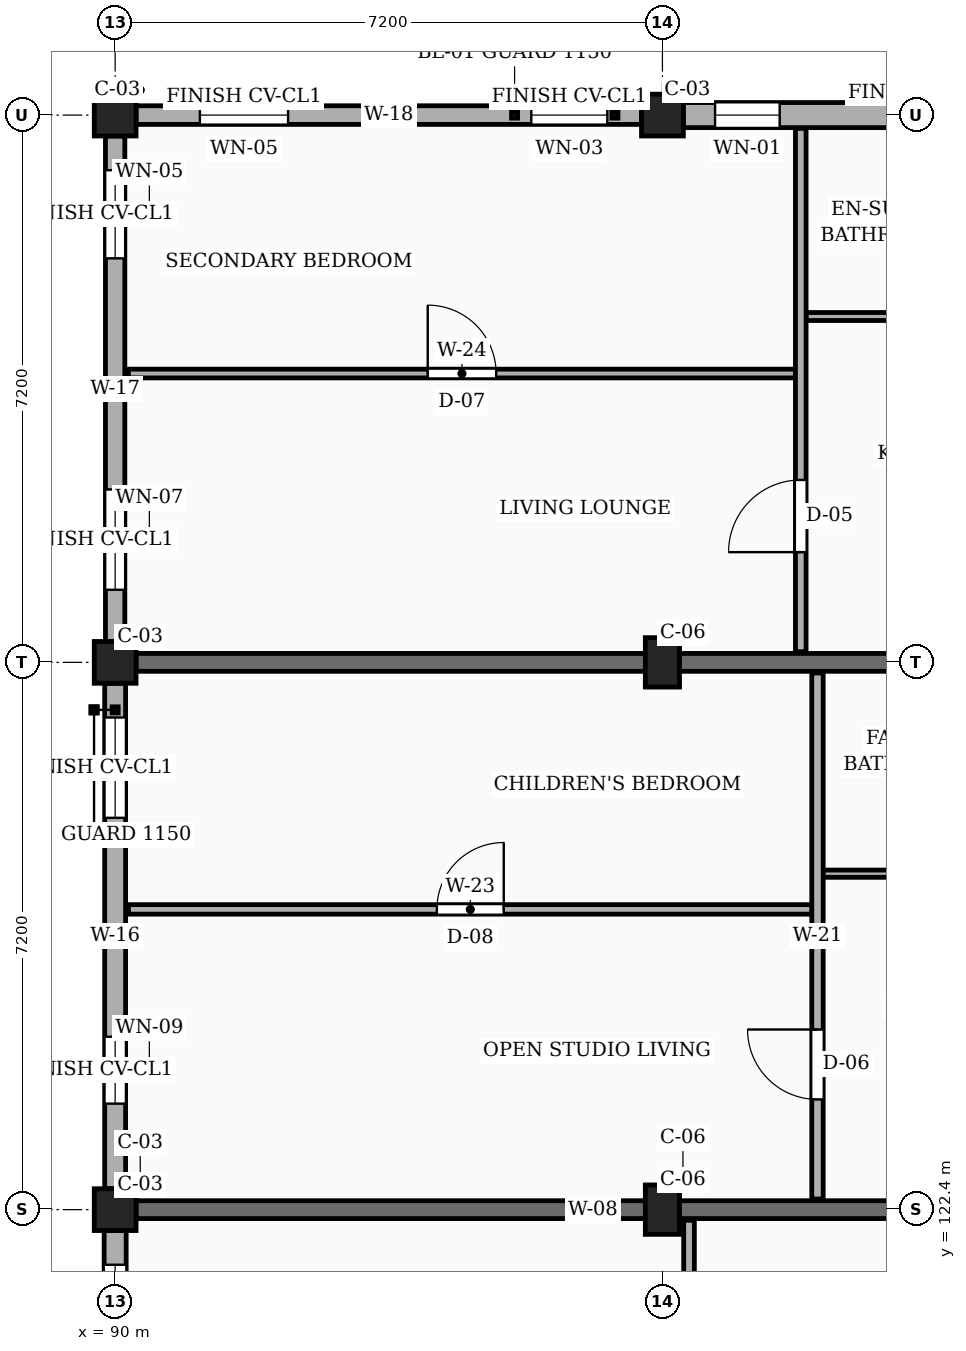
"""IFC4 building model, lengths in metres.
Left out: names, types, materials, properties, quantities, classifications, styles, units other than length and angle.
Written with IfcOpenShell. Run it as: python <this file> out.ifc"""

import sys

from ifc_helpers import new_model, si_unit, direction, frame, frame_2d, origin, origin_2d, place, context, subcontext, project, spatial, rectangle, extrude, element, fill, save


model = new_model("IFC4")
c1 = context("Model", 3, precision=1e-05, world=origin(), true_north=direction((0.0, 1.0)))
c2 = subcontext(c1, "Body", "Model", "MODEL_VIEW")
j1 = project(units=[si_unit("LENGTHUNIT", "METRE"), si_unit("PLANEANGLEUNIT", "RADIAN")], contexts=[c1])
p1 = place(None, origin())
s1 = spatial("IfcSite", under=j1, at=p1, CompositionType="ELEMENT")
p2 = place(p1, origin())
s2 = spatial("IfcBuilding", under=s1, at=p2, CompositionType="ELEMENT")
p3 = place(p2, frame((0.0, 0.0, 20.25)))
s3 = spatial("IfcBuildingStorey", under=s2, at=p3, CompositionType="ELEMENT", Elevation=20.25)
for number, where, z_axis, x_axis in (
    (1, (90.0, 122.4, 0.0), (0.0, 0.0, 1.0), (1.0, 0.0, 0.0)),
    (2, (90.0, 129.6, 0.0), (0.0, 0.0, 1.0), (1.0, 0.0, 0.0)),
    (3, (90.0, 136.8, 0.0), (0.0, 0.0, 1.0), (1.0, 0.0, 0.0)),
):
    element("IfcColumn", number, at=place(p3, frame(where, z_axis=z_axis, x_axis=x_axis)), inside=s3, PredefinedType="COLUMN", context=c2, shape_type="SweptSolid", body=[
        extrude(rectangle(XDim=0.55, YDim=0.55, at=origin_2d()), origin(), (0.0, 0.0, 1.0), 3.15),
    ])
for number, where, z_axis, x_axis in (
    (4, (97.2, 122.4, 0.0), (0.0, 0.0, 1.0), (1.0, 0.0, 0.0)),
    (5, (97.2, 129.6, 0.0), (0.0, 0.0, 1.0), (1.0, 0.0, 0.0)),
):
    element("IfcColumn", number, at=place(p3, frame(where, z_axis=z_axis, x_axis=x_axis)), inside=s3, PredefinedType="COLUMN", context=c2, shape_type="SweptSolid", body=[
        extrude(rectangle(XDim=0.45, YDim=0.65, at=origin_2d()), origin(), (0.0, 0.0, 1.0), 3.15),
    ])
p4 = place(p3, frame((97.2, 136.8, 0.0), z_axis=(0.0, 0.0, 1.0), x_axis=(1.0, 0.0, 0.0)))
e6 = element("IfcColumn", 6, at=p4, inside=s3, PredefinedType="COLUMN", context=c2, shape_type="SweptSolid", body=[
    extrude(rectangle(XDim=0.55, YDim=0.55, at=origin_2d()), origin(), (0.0, 0.0, 1.0), 3.15),
])
for number, where, z_axis, x_axis in (
    (7, (90.275, 122.4, 0.0), (0.0, 0.0, 1.0), (1.0, 0.0, 0.0)),
    (8, (90.275, 129.6, 0.0), (0.0, 0.0, 1.0), (1.0, 0.0, 0.0)),
):
    element("IfcWall", number, at=place(p3, frame(where, z_axis=z_axis, x_axis=x_axis)), inside=s3, PredefinedType="SOLIDWALL", context=c2, shape_type="SweptSolid", body=[
        extrude(rectangle(XDim=12.025, YDim=0.235, at=frame_2d((6.013, 0.0))), origin(), (0.0, 0.0, 1.0), 2.19),
    ])
p5 = place(p3, frame((104.125, 136.8, 0.0), z_axis=(0.0, 0.0, 1.0), x_axis=(-1.0, 0.0, 0.0)))
e9 = element("IfcWall", 9, at=p5, inside=s3, PredefinedType="SOLIDWALL", context=c2, shape_type="SweptSolid", body=[
    extrude(rectangle(XDim=6.65, YDim=0.33, at=frame_2d((3.325, 0.0))), origin(), (0.0, 0.0, 1.0), 2.46),
])
p6 = place(p5, frame((0.462, 0.0, 0.78)))
e10 = element("IfcOpeningElement", 10, at=p6, cuts=e9, PredefinedType="OPENING", context=c2, shape_type="SweptSolid", body=[
    extrude(rectangle(XDim=1.04, YDim=1.26, at=frame_2d((0.52, 0.63))), frame((0.0, 0.175, 0.0), z_axis=(0.0, -1.0, 0.0), x_axis=(1.0, 0.0, 0.0)), (0.0, 0.0, 1.0), 0.35),
])
p7 = place(p5, frame((3.005, 0.0, 0.78)))
e11 = element("IfcOpeningElement", 11, at=p7, cuts=e9, PredefinedType="OPENING", context=c2, shape_type="SweptSolid", body=[
    extrude(rectangle(XDim=0.92, YDim=1.15, at=frame_2d((0.46, 0.575))), frame((0.0, 0.175, 0.0), z_axis=(0.0, -1.0, 0.0), x_axis=(1.0, 0.0, 0.0)), (0.0, 0.0, 1.0), 0.35),
])
p8 = place(p5, frame((5.383, 0.0, 0.78)))
e12 = element("IfcOpeningElement", 12, at=p8, cuts=e9, PredefinedType="OPENING", context=c2, shape_type="SweptSolid", body=[
    extrude(rectangle(XDim=0.85, YDim=1.15, at=frame_2d((0.425, 0.575))), frame((0.0, 0.175, 0.0), z_axis=(0.0, -1.0, 0.0), x_axis=(1.0, 0.0, 0.0)), (0.0, 0.0, 1.0), 0.35),
])
p9 = place(p3, frame((96.925, 136.8, 0.0), z_axis=(0.0, 0.0, 1.0), x_axis=(-1.0, 0.0, 0.0)))
e13 = element("IfcWall", 13, at=p9, inside=s3, PredefinedType="SOLIDWALL", context=c2, shape_type="SweptSolid", body=[
    extrude(rectangle(XDim=6.65, YDim=0.245, at=frame_2d((3.325, 0.0))), origin(), (0.0, 0.0, 1.0), 2.46),
])
p10 = place(p9, frame((0.45, 0.0, 0.78)))
e14 = element("IfcOpeningElement", 14, at=p10, cuts=e13, PredefinedType="OPENING", context=c2, shape_type="SweptSolid", body=[
    extrude(rectangle(XDim=1.0, YDim=1.15, at=frame_2d((0.5, 0.575))), frame((0.0, 0.133, 0.0), z_axis=(0.0, -1.0, 0.0), x_axis=(1.0, 0.0, 0.0)), (0.0, 0.0, 1.0), 0.265),
])
p11 = place(p9, frame((4.65, 0.0, 0.78)))
e15 = element("IfcOpeningElement", 15, at=p11, cuts=e13, PredefinedType="OPENING", context=c2, shape_type="SweptSolid", body=[
    extrude(rectangle(XDim=1.16, YDim=1.15, at=frame_2d((0.58, 0.575))), frame((0.0, 0.133, 0.0), z_axis=(0.0, -1.0, 0.0), x_axis=(1.0, 0.0, 0.0)), (0.0, 0.0, 1.0), 0.265),
])
p12 = place(p3, frame((90.0, 136.525, 0.0), z_axis=(0.0, 0.0, 1.0), x_axis=(0.0, -1.0, 0.0)))
e16 = element("IfcWall", 16, at=p12, inside=s3, PredefinedType="SOLIDWALL", context=c2, shape_type="SweptSolid", body=[
    extrude(rectangle(XDim=6.65, YDim=0.255, at=frame_2d((3.325, 0.0))), origin(), (0.0, 0.0, 1.0), 2.46),
])
p13 = place(p12, frame((0.45, 0.0, 0.78)))
e17 = element("IfcOpeningElement", 17, at=p13, cuts=e16, PredefinedType="OPENING", context=c2, shape_type="SweptSolid", body=[
    extrude(rectangle(XDim=1.16, YDim=1.15, at=frame_2d((0.58, 0.575))), frame((0.0, 0.137, 0.0), z_axis=(0.0, -1.0, 0.0), x_axis=(1.0, 0.0, 0.0)), (0.0, 0.0, 1.0), 0.275),
])
p14 = place(p12, frame((4.65, 0.0, 0.78)))
e18 = element("IfcOpeningElement", 18, at=p14, cuts=e16, PredefinedType="OPENING", context=c2, shape_type="SweptSolid", body=[
    extrude(rectangle(XDim=1.32, YDim=1.15, at=frame_2d((0.66, 0.575))), frame((0.0, 0.137, 0.0), z_axis=(0.0, -1.0, 0.0), x_axis=(1.0, 0.0, 0.0)), (0.0, 0.0, 1.0), 0.275),
])
p15 = place(p3, frame((90.0, 129.325, 0.0), z_axis=(0.0, 0.0, 1.0), x_axis=(0.0, -1.0, 0.0)))
e19 = element("IfcWall", 19, at=p15, inside=s3, PredefinedType="SOLIDWALL", context=c2, shape_type="SweptSolid", body=[
    extrude(rectangle(XDim=6.65, YDim=0.275, at=frame_2d((3.325, 0.0))), origin(), (0.0, 0.0, 1.0), 2.46),
])
p16 = place(p15, frame((0.45, 0.0, 0.78)))
e20 = element("IfcOpeningElement", 20, at=p16, cuts=e19, PredefinedType="OPENING", context=c2, shape_type="SweptSolid", body=[
    extrude(rectangle(XDim=1.32, YDim=1.15, at=frame_2d((0.66, 0.575))), frame((0.0, 0.147, 0.0), z_axis=(0.0, -1.0, 0.0), x_axis=(1.0, 0.0, 0.0)), (0.0, 0.0, 1.0), 0.295),
])
p17 = place(p15, frame((4.65, 0.0, 0.78)))
e21 = element("IfcOpeningElement", 21, at=p17, cuts=e19, PredefinedType="OPENING", context=c2, shape_type="SweptSolid", body=[
    extrude(rectangle(XDim=0.88, YDim=1.26, at=frame_2d((0.44, 0.63))), frame((0.0, 0.147, 0.0), z_axis=(0.0, -1.0, 0.0), x_axis=(1.0, 0.0, 0.0)), (0.0, 0.0, 1.0), 0.295),
])
p18 = place(p3, frame((90.0, 122.125, 0.0), z_axis=(0.0, 0.0, 1.0), x_axis=(0.0, -1.0, 0.0)))
e22 = element("IfcWall", 22, at=p18, inside=s3, PredefinedType="SOLIDWALL", context=c2, shape_type="SweptSolid", body=[
    extrude(rectangle(XDim=6.65, YDim=0.29, at=frame_2d((3.325, 0.0))), origin(), (0.0, 0.0, 1.0), 2.46),
])
p19 = place(p18, frame((0.45, 0.0, 0.78)))
e23 = element("IfcOpeningElement", 23, at=p19, cuts=e22, PredefinedType="OPENING", context=c2, shape_type="SweptSolid", body=[
    extrude(rectangle(XDim=0.88, YDim=1.26, at=frame_2d((0.44, 0.63))), frame((0.0, 0.155, 0.0), z_axis=(0.0, -1.0, 0.0), x_axis=(1.0, 0.0, 0.0)), (0.0, 0.0, 1.0), 0.31),
])
p20 = place(p18, frame((4.65, 0.0, 0.78)))
e24 = element("IfcOpeningElement", 24, at=p20, cuts=e22, PredefinedType="OPENING", context=c2, shape_type="SweptSolid", body=[
    extrude(rectangle(XDim=1.04, YDim=1.26, at=frame_2d((0.52, 0.63))), frame((0.0, 0.155, 0.0), z_axis=(0.0, -1.0, 0.0), x_axis=(1.0, 0.0, 0.0)), (0.0, 0.0, 1.0), 0.31),
])
p21 = place(p3, frame((97.55, 115.34, 0.0), z_axis=(0.0, 0.0, 1.0), x_axis=(0.0, 1.0, 0.0)))
e25 = element("IfcWall", 25, at=p21, inside=s3, PredefinedType="PARTITIONING", context=c2, shape_type="SweptSolid", body=[
    extrude(rectangle(XDim=6.92, YDim=0.14, at=frame_2d((3.46, 0.0))), origin(), (0.0, 0.0, 1.0), 2.325),
])
p22 = place(p21, frame((4.66, 0.0, 0.0)))
e26 = element("IfcOpeningElement", 26, at=p22, cuts=e25, PredefinedType="OPENING", context=c2, shape_type="SweptSolid", body=[
    extrude(rectangle(XDim=0.95, YDim=2.1, at=frame_2d((0.475, 1.05))), frame((0.0, 0.08, 0.0), z_axis=(0.0, -1.0, 0.0), x_axis=(1.0, 0.0, 0.0)), (0.0, 0.0, 1.0), 0.16),
])
p23 = place(p3, frame((90.175, 126.35, 0.0), z_axis=(0.0, 0.0, 1.0), x_axis=(1.0, 0.0, 0.0)))
e27 = element("IfcWall", 27, at=p23, inside=s3, PredefinedType="PARTITIONING", context=c2, shape_type="SweptSolid", body=[
    extrude(rectangle(XDim=8.995, YDim=0.125, at=frame_2d((4.498, 0.0))), origin(), (0.0, 0.0, 1.0), 2.325),
])
p24 = place(p23, frame((4.058, 0.0, 0.0)))
e28 = element("IfcOpeningElement", 28, at=p24, cuts=e27, PredefinedType="OPENING", context=c2, shape_type="SweptSolid", body=[
    extrude(rectangle(XDim=0.88, YDim=2.08, at=frame_2d((0.44, 1.04))), frame((0.0, 0.073, 0.0), z_axis=(0.0, -1.0, 0.0), x_axis=(1.0, 0.0, 0.0)), (0.0, 0.0, 1.0), 0.145),
])
p25 = place(p3, frame((99.31, 126.82, 0.0), z_axis=(0.0, 0.0, 1.0), x_axis=(1.0, 0.0, 0.0)))
e29 = element("IfcWall", 29, at=p25, inside=s3, PredefinedType="PARTITIONING", context=c2, shape_type="SweptSolid", body=[
    extrude(rectangle(XDim=2.9, YDim=0.095, at=frame_2d((1.45, 0.0))), origin(), (0.0, 0.0, 1.0), 2.325),
])
p26 = place(p25, frame((1.015, 0.0, 0.0)))
e30 = element("IfcOpeningElement", 30, at=p26, cuts=e29, PredefinedType="OPENING", context=c2, shape_type="SweptSolid", body=[
    extrude(rectangle(XDim=0.87, YDim=2.05, at=frame_2d((0.435, 1.025))), frame((0.0, 0.058, 0.0), z_axis=(0.0, -1.0, 0.0), x_axis=(1.0, 0.0, 0.0)), (0.0, 0.0, 1.0), 0.115),
])
p27 = place(p3, frame((99.24, 122.54, 0.0), z_axis=(0.0, 0.0, 1.0), x_axis=(0.0, 1.0, 0.0)))
e31 = element("IfcWall", 31, at=p27, inside=s3, PredefinedType="PARTITIONING", context=c2, shape_type="SweptSolid", body=[
    extrude(rectangle(XDim=6.92, YDim=0.15, at=frame_2d((3.46, 0.0))), origin(), (0.0, 0.0, 1.0), 2.325),
])
p28 = place(p27, frame((1.31, 0.0, 0.0)))
e32 = element("IfcOpeningElement", 32, at=p28, cuts=e31, PredefinedType="OPENING", context=c2, shape_type="SweptSolid", body=[
    extrude(rectangle(XDim=0.92, YDim=2.1, at=frame_2d((0.46, 1.05))), frame((0.0, 0.085, 0.0), z_axis=(0.0, -1.0, 0.0), x_axis=(1.0, 0.0, 0.0)), (0.0, 0.0, 1.0), 0.17),
])
p29 = place(p3, frame((90.175, 133.4, 0.0), z_axis=(0.0, 0.0, 1.0), x_axis=(1.0, 0.0, 0.0)))
e33 = element("IfcWall", 33, at=p29, inside=s3, PredefinedType="PARTITIONING", context=c2, shape_type="SweptSolid", body=[
    extrude(rectangle(XDim=8.775, YDim=0.115, at=frame_2d((4.387, 0.0))), origin(), (0.0, 0.0, 1.0), 2.325),
])
p30 = place(p29, frame((3.938, 0.0, 0.0)))
e34 = element("IfcOpeningElement", 34, at=p30, cuts=e33, PredefinedType="OPENING", context=c2, shape_type="SweptSolid", body=[
    extrude(rectangle(XDim=0.9, YDim=2.1, at=frame_2d((0.45, 1.05))), frame((0.0, 0.067, 0.0), z_axis=(0.0, -1.0, 0.0), x_axis=(1.0, 0.0, 0.0)), (0.0, 0.0, 1.0), 0.135),
])
p31 = place(p3, frame((99.09, 134.15, 0.0), z_axis=(0.0, 0.0, 1.0), x_axis=(1.0, 0.0, 0.0)))
e35 = element("IfcWall", 35, at=p31, inside=s3, PredefinedType="PARTITIONING", context=c2, shape_type="SweptSolid", body=[
    extrude(rectangle(XDim=3.12, YDim=0.105, at=frame_2d((1.56, 0.0))), origin(), (0.0, 0.0, 1.0), 2.325),
])
p32 = place(p31, frame((1.11, 0.0, 0.0)))
e36 = element("IfcOpeningElement", 36, at=p32, cuts=e35, PredefinedType="OPENING", context=c2, shape_type="SweptSolid", body=[
    extrude(rectangle(XDim=0.9, YDim=2.05, at=frame_2d((0.45, 1.025))), frame((0.0, 0.062, 0.0), z_axis=(0.0, -1.0, 0.0), x_axis=(1.0, 0.0, 0.0)), (0.0, 0.0, 1.0), 0.125),
])
p33 = place(p3, frame((99.02, 129.74, 0.0), z_axis=(0.0, 0.0, 1.0), x_axis=(0.0, 1.0, 0.0)))
e37 = element("IfcWall", 37, at=p33, inside=s3, PredefinedType="PARTITIONING", context=c2, shape_type="SweptSolid", body=[
    extrude(rectangle(XDim=6.885, YDim=0.14, at=frame_2d((3.442, 0.0))), origin(), (0.0, 0.0, 1.0), 2.325),
])
p34 = place(p33, frame((1.31, 0.0, 0.0)))
e38 = element("IfcOpeningElement", 38, at=p34, cuts=e37, PredefinedType="OPENING", context=c2, shape_type="SweptSolid", body=[
    extrude(rectangle(XDim=0.95, YDim=2.1, at=frame_2d((0.475, 1.05))), frame((0.0, 0.08, 0.0), z_axis=(0.0, -1.0, 0.0), x_axis=(1.0, 0.0, 0.0)), (0.0, 0.0, 1.0), 0.16),
])
p35 = place(p8, origin())
e39 = element("IfcWindow", 39, at=p35, inside=s3, PartitioningType="SINGLE_PANEL", PredefinedType="WINDOW", context=c2, shape_type="SweptSolid", body=[
    extrude(rectangle(XDim=0.85, YDim=1.15, at=frame_2d((0.425, 0.575))), frame((0.0, 0.03, 0.0), z_axis=(0.0, -1.0, 0.0), x_axis=(1.0, 0.0, 0.0)), (0.0, 0.0, 1.0), 0.06),
])
fill(e12, e39)
p36 = place(p10, origin())
e40 = element("IfcWindow", 40, at=p36, inside=s3, PartitioningType="SINGLE_PANEL", PredefinedType="WINDOW", context=c2, shape_type="SweptSolid", body=[
    extrude(rectangle(XDim=1.0, YDim=1.15, at=frame_2d((0.5, 0.575))), frame((0.0, 0.03, 0.0), z_axis=(0.0, -1.0, 0.0), x_axis=(1.0, 0.0, 0.0)), (0.0, 0.0, 1.0), 0.06),
])
fill(e14, e40)
p37 = place(p11, origin())
e41 = element("IfcWindow", 41, at=p37, inside=s3, PartitioningType="SINGLE_PANEL", PredefinedType="WINDOW", context=c2, shape_type="SweptSolid", body=[
    extrude(rectangle(XDim=1.16, YDim=1.15, at=frame_2d((0.58, 0.575))), frame((0.0, 0.03, 0.0), z_axis=(0.0, -1.0, 0.0), x_axis=(1.0, 0.0, 0.0)), (0.0, 0.0, 1.0), 0.06),
])
fill(e15, e41)
p38 = place(p13, origin())
e42 = element("IfcWindow", 42, at=p38, inside=s3, PartitioningType="SINGLE_PANEL", PredefinedType="WINDOW", context=c2, shape_type="SweptSolid", body=[
    extrude(rectangle(XDim=1.16, YDim=1.15, at=frame_2d((0.58, 0.575))), frame((0.0, 0.03, 0.0), z_axis=(0.0, -1.0, 0.0), x_axis=(1.0, 0.0, 0.0)), (0.0, 0.0, 1.0), 0.06),
])
fill(e17, e42)
p39 = place(p14, origin())
e43 = element("IfcWindow", 43, at=p39, inside=s3, PartitioningType="SINGLE_PANEL", PredefinedType="WINDOW", context=c2, shape_type="SweptSolid", body=[
    extrude(rectangle(XDim=1.32, YDim=1.15, at=frame_2d((0.66, 0.575))), frame((0.0, 0.03, 0.0), z_axis=(0.0, -1.0, 0.0), x_axis=(1.0, 0.0, 0.0)), (0.0, 0.0, 1.0), 0.06),
])
fill(e18, e43)
p40 = place(p16, origin())
e44 = element("IfcWindow", 44, at=p40, inside=s3, PartitioningType="SINGLE_PANEL", PredefinedType="WINDOW", context=c2, shape_type="SweptSolid", body=[
    extrude(rectangle(XDim=1.32, YDim=1.15, at=frame_2d((0.66, 0.575))), frame((0.0, 0.03, 0.0), z_axis=(0.0, -1.0, 0.0), x_axis=(1.0, 0.0, 0.0)), (0.0, 0.0, 1.0), 0.06),
])
fill(e20, e44)
p41 = place(p17, origin())
e45 = element("IfcWindow", 45, at=p41, inside=s3, PartitioningType="SINGLE_PANEL", PredefinedType="WINDOW", context=c2, shape_type="SweptSolid", body=[
    extrude(rectangle(XDim=0.88, YDim=1.26, at=frame_2d((0.44, 0.63))), frame((0.0, 0.03, 0.0), z_axis=(0.0, -1.0, 0.0), x_axis=(1.0, 0.0, 0.0)), (0.0, 0.0, 1.0), 0.06),
])
fill(e21, e45)
p42 = place(p19, origin())
e46 = element("IfcWindow", 46, at=p42, inside=s3, PartitioningType="SINGLE_PANEL", PredefinedType="WINDOW", context=c2, shape_type="SweptSolid", body=[
    extrude(rectangle(XDim=0.88, YDim=1.26, at=frame_2d((0.44, 0.63))), frame((0.0, 0.03, 0.0), z_axis=(0.0, -1.0, 0.0), x_axis=(1.0, 0.0, 0.0)), (0.0, 0.0, 1.0), 0.06),
])
fill(e23, e46)
p43 = place(p24, origin())
e47 = element("IfcDoor", 47, at=p43, inside=s3, OperationType="SINGLE_SWING_RIGHT", PredefinedType="DOOR", context=c2, shape_type="SweptSolid", body=[
    extrude(rectangle(XDim=0.88, YDim=2.08, at=frame_2d((0.44, 1.04))), frame((0.0, 0.025, 0.0), z_axis=(0.0, -1.0, 0.0), x_axis=(1.0, 0.0, 0.0)), (0.0, 0.0, 1.0), 0.05),
])
fill(e28, e47)
p44 = place(p28, origin())
e48 = element("IfcDoor", 48, at=p44, inside=s3, OperationType="SINGLE_SWING_RIGHT", PredefinedType="DOOR", context=c2, shape_type="SweptSolid", body=[
    extrude(rectangle(XDim=0.92, YDim=2.1, at=frame_2d((0.46, 1.05))), frame((0.0, 0.025, 0.0), z_axis=(0.0, -1.0, 0.0), x_axis=(1.0, 0.0, 0.0)), (0.0, 0.0, 1.0), 0.05),
])
fill(e32, e48)
p45 = place(p30, origin())
e49 = element("IfcDoor", 49, at=p45, inside=s3, OperationType="SINGLE_SWING_LEFT", PredefinedType="DOOR", context=c2, shape_type="SweptSolid", body=[
    extrude(rectangle(XDim=0.9, YDim=2.1, at=frame_2d((0.45, 1.05))), frame((0.0, 0.025, 0.0), z_axis=(0.0, -1.0, 0.0), x_axis=(1.0, 0.0, 0.0)), (0.0, 0.0, 1.0), 0.05),
])
fill(e34, e49)
p46 = place(p34, origin())
e50 = element("IfcDoor", 50, at=p46, inside=s3, OperationType="SINGLE_SWING_LEFT", PredefinedType="DOOR", context=c2, shape_type="SweptSolid", body=[
    extrude(rectangle(XDim=0.95, YDim=2.1, at=frame_2d((0.475, 1.05))), frame((0.0, 0.025, 0.0), z_axis=(0.0, -1.0, 0.0), x_axis=(1.0, 0.0, 0.0)), (0.0, 0.0, 1.0), 0.05),
])
fill(e38, e50)
save(model, sys.argv[1])
